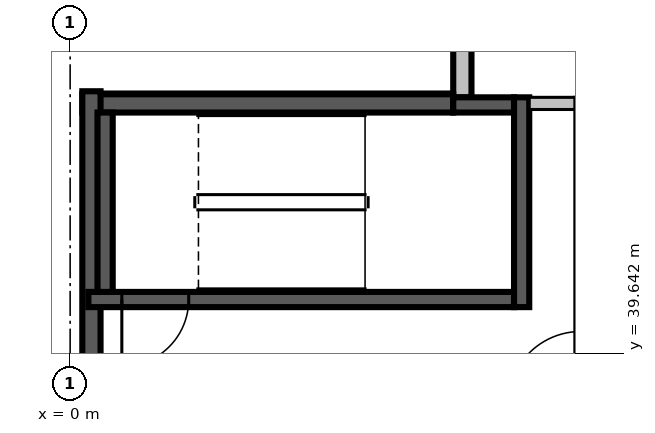
"""IFC4 building model, lengths in metres.
Left out: names, types, materials, properties, quantities, classifications, styles, units other than length and angle.
Written with IfcOpenShell. Run it as: python <this file> out.ifc"""

import sys

from ifc_helpers import new_model, si_unit, direction, frame, frame_2d, origin, place, context, subcontext, project, spatial, rectangle, extrude, source, transform, mapped, element, fill, save


model = new_model("IFC4")
c1 = context("Model", 3, precision=1e-05, world=origin(), true_north=direction((0.0, 1.0)))
c2 = subcontext(c1, "Body", "Model", "MODEL_VIEW")
j1 = project(units=[si_unit("LENGTHUNIT", "METRE"), si_unit("PLANEANGLEUNIT", "RADIAN")], contexts=[c1])
p1 = place(None, origin())
s1 = spatial("IfcSite", under=j1, at=p1, CompositionType="ELEMENT")
p2 = place(p1, origin())
s2 = spatial("IfcBuilding", under=s1, at=p2, CompositionType="ELEMENT")
p3 = place(p2, frame((0.0, 0.0, 120.3)))
s3 = spatial("IfcBuildingStorey", under=s2, at=p3, CompositionType="ELEMENT", Elevation=120.3)
m1 = source(origin(), c2, "Body", "SweptSolid", [
    extrude(rectangle(XDim=9.91, YDim=0.3, at=frame_2d((4.955, 0.0))), origin(), (0.0, 0.0, 1.0), 3.8),
])
p4 = place(p3, frame((6.45, 53.76, 0.0), z_axis=(0.0, 0.0, 1.0), x_axis=(0.0, -1.0, 0.0)))
e1 = element("IfcWall", 1, at=p4, inside=s3, PredefinedType="STANDARD", context=c2, shape_type="MappedRepresentation", body=[
    mapped(m1, transform((0.0, 0.0, 0.0), scale=1.0)),
])
m2 = source(origin(), c2, "Body", "SweptSolid", [
    extrude(rectangle(XDim=3.6, YDim=2.7, at=frame_2d((1.8, 1.35))), frame((0.0, 0.16, 0.0), z_axis=(0.0, -1.0, 0.0), x_axis=(1.0, 0.0, 0.0)), (0.0, 0.0, 1.0), 0.32),
])
p5 = place(p4, frame((3.39, 0.0, 0.6)))
e2 = element("IfcOpeningElement", 2, at=p5, cuts=e1, PredefinedType="OPENING", context=c2, shape_type="MappedRepresentation", body=[
    mapped(m2, transform((0.0, 0.0, 0.0), scale=1.0)),
])
m3 = source(origin(), c2, "Body", "SweptSolid", [
    extrude(rectangle(XDim=2.4, YDim=2.7, at=frame_2d((1.2, 1.35))), frame((0.0, 0.16, 0.0), z_axis=(0.0, -1.0, 0.0), x_axis=(1.0, 0.0, 0.0)), (0.0, 0.0, 1.0), 0.32),
])
p6 = place(p4, frame((0.495, 0.0, 0.6)))
e3 = element("IfcOpeningElement", 3, at=p6, cuts=e1, PredefinedType="OPENING", context=c2, shape_type="MappedRepresentation", body=[
    mapped(m3, transform((0.0, 0.0, 0.0), scale=1.0)),
])
m4 = source(origin(), c2, "Body", "SweptSolid", [
    extrude(rectangle(XDim=6.1, YDim=0.3, at=frame_2d((3.05, 0.0))), origin(), (0.0, 0.0, 1.0), 3.8),
])
p7 = place(p3, frame((6.3, 43.75, 0.0), z_axis=(0.0, 0.0, 1.0), x_axis=(-1.0, 0.0, 0.0)))
e4 = element("IfcWall", 4, at=p7, inside=s3, PredefinedType="SOLIDWALL", context=c2, shape_type="MappedRepresentation", body=[
    mapped(m4, transform((0.0, 0.0, 0.0), scale=1.0)),
])
m5 = source(origin(), c2, "Body", "SweptSolid", [
    extrude(rectangle(XDim=5.65, YDim=0.3, at=frame_2d((2.825, 0.0))), origin(), (0.0, 0.0, 1.0), 3.8),
])
p8 = place(p3, frame((0.35, 43.95, 0.0), z_axis=(0.0, 0.0, 1.0), x_axis=(0.0, -1.0, 0.0)))
e5 = element("IfcWall", 5, at=p8, inside=s3, PredefinedType="SOLIDWALL", context=c2, shape_type="MappedRepresentation", body=[
    mapped(m5, transform((0.0, 0.0, 0.0), scale=1.0)),
])
m6 = source(origin(), c2, "Body", "SweptSolid", [
    extrude(rectangle(XDim=7.0, YDim=0.25, at=frame_2d((3.5, 0.0))), origin(), (0.0, 0.0, 1.0), 3.8),
])
p9 = place(p3, frame((0.3, 40.525, 0.0), z_axis=(0.0, 0.0, 1.0), x_axis=(1.0, 0.0, 0.0)))
e6 = element("IfcWall", 6, at=p9, inside=s3, PredefinedType="SOLIDWALL", context=c2, shape_type="MappedRepresentation", body=[
    mapped(m6, transform((0.0, 0.0, 0.0), scale=1.0)),
])
m7 = source(origin(), c2, "Body", "SweptSolid", [
    extrude(rectangle(XDim=1.1, YDim=2.1, at=frame_2d((0.55, 1.05))), frame((0.0, 0.135, 0.0), z_axis=(0.0, -1.0, 0.0), x_axis=(1.0, 0.0, 0.0)), (0.0, 0.0, 1.0), 0.27),
])
p10 = place(p9, frame((0.55, 0.0, 0.0)))
e7 = element("IfcOpeningElement", 7, at=p10, cuts=e6, PredefinedType="OPENING", context=c2, shape_type="MappedRepresentation", body=[
    mapped(m7, transform((0.0, 0.0, 0.0), scale=1.0)),
])
m8 = source(origin(), c2, "Body", "SweptSolid", [
    extrude(rectangle(XDim=1.0, YDim=0.25, at=frame_2d((0.5, 0.0))), origin(), (0.0, 0.0, 1.0), 3.8),
])
p11 = place(p3, frame((6.3, 43.725, 0.0), z_axis=(0.0, 0.0, 1.0), x_axis=(1.0, 0.0, 0.0)))
e8 = element("IfcWall", 8, at=p11, inside=s3, PredefinedType="SOLIDWALL", context=c2, shape_type="MappedRepresentation", body=[
    mapped(m8, transform((0.0, 0.0, 0.0), scale=1.0)),
])
m9 = source(origin(), c2, "Body", "SweptSolid", [
    extrude(rectangle(XDim=3.45, YDim=0.25, at=frame_2d((1.725, 0.0))), origin(), (0.0, 0.0, 1.0), 3.8),
])
p12 = place(p3, frame((7.425, 40.4, 0.0), z_axis=(0.0, 0.0, 1.0), x_axis=(0.0, 1.0, 0.0)))
e9 = element("IfcWall", 9, at=p12, inside=s3, PredefinedType="SOLIDWALL", context=c2, shape_type="MappedRepresentation", body=[
    mapped(m9, transform((0.0, 0.0, 0.0), scale=1.0)),
])
m10 = source(origin(), c2, "Body", "SweptSolid", [
    extrude(rectangle(XDim=2.95, YDim=0.25, at=frame_2d((1.475, 0.0))), origin(), (0.0, 0.0, 1.0), 3.8),
])
p13 = place(p3, frame((0.575, 40.65, 0.0), z_axis=(0.0, 0.0, 1.0), x_axis=(0.0, 1.0, 0.0)))
e10 = element("IfcWall", 10, at=p13, inside=s3, PredefinedType="SOLIDWALL", context=c2, shape_type="MappedRepresentation", body=[
    mapped(m10, transform((0.0, 0.0, 0.0), scale=1.0)),
])
m11 = source(origin(), c2, "Body", "SweptSolid", [
    extrude(rectangle(XDim=0.75, YDim=0.2, at=frame_2d((0.375, 0.0))), origin(), (0.0, 0.0, 1.0), 3.8),
])
p14 = place(p3, frame((7.55, 43.75, 0.0), z_axis=(0.0, 0.0, 1.0), x_axis=(1.0, 0.0, 0.0)))
e11 = element("IfcWall", 11, at=p14, inside=s3, PredefinedType="PARTITIONING", context=c2, shape_type="MappedRepresentation", body=[
    mapped(m11, transform((0.0, 0.0, 0.0), scale=1.0)),
])
m12 = source(origin(), c2, "Body", "SweptSolid", [
    extrude(rectangle(XDim=1.1, YDim=2.1, at=frame_2d((0.55, 1.05))), frame((0.0, 0.025, 0.0), z_axis=(0.0, -1.0, 0.0), x_axis=(1.0, 0.0, 0.0)), (0.0, 0.0, 1.0), 0.05),
])
p15 = place(p10, origin())
e12 = element("IfcDoor", 12, at=p15, inside=s3, OperationType="SINGLE_SWING_RIGHT", PredefinedType="DOOR", context=c2, shape_type="MappedRepresentation", body=[
    mapped(m12, transform((0.0, 0.0, 0.0), scale=1.0)),
])
fill(e7, e12)
save(model, sys.argv[1])
